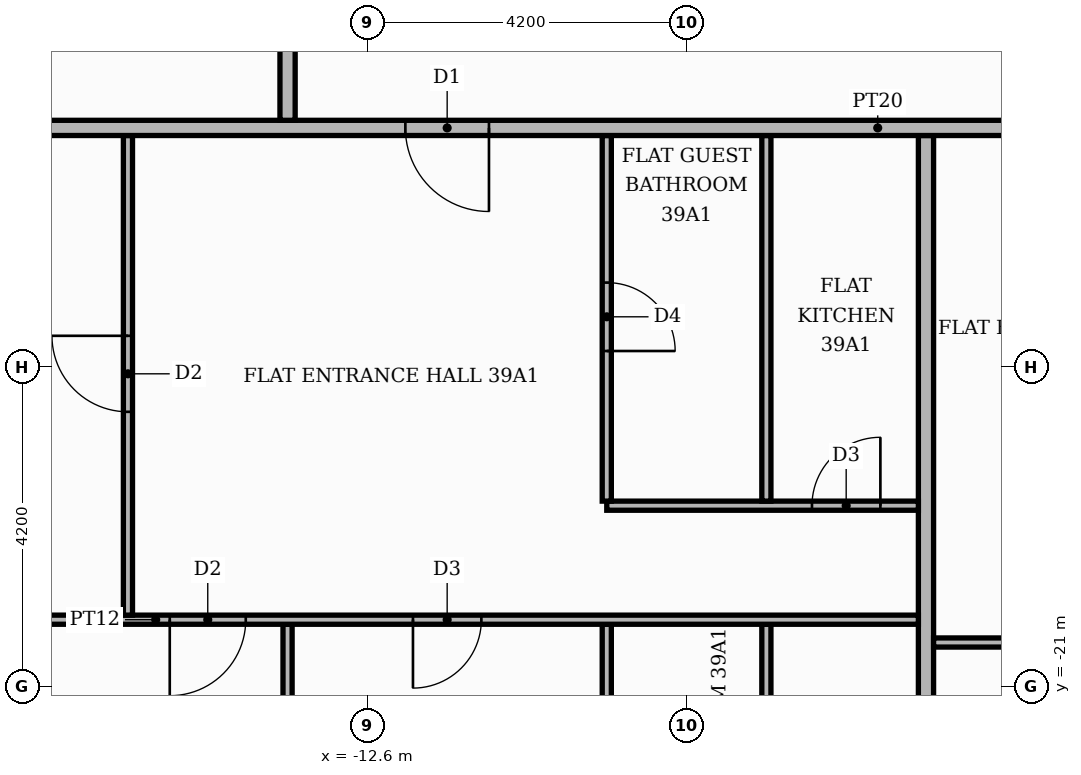
"""IFC4 building model, lengths in metres.
Left out: names, types, materials, properties, quantities, classifications, styles, units other than length and angle.
Written with IfcOpenShell. Run it as: python <this file> out.ifc"""

import sys

from ifc_helpers import new_model, si_unit, direction, frame, frame_2d, origin, place, context, subcontext, project, spatial, rectangle, extrude, element, fill, save


model = new_model("IFC4")
c1 = context("Model", 3, precision=1e-05, world=origin(), true_north=direction((0.0, 1.0)))
c2 = subcontext(c1, "Body", "Model", "MODEL_VIEW")
j1 = project(units=[si_unit("LENGTHUNIT", "METRE"), si_unit("PLANEANGLEUNIT", "RADIAN")], contexts=[c1])
p1 = place(None, origin())
s1 = spatial("IfcSite", under=j1, at=p1, CompositionType="ELEMENT")
p2 = place(p1, origin())
s2 = spatial("IfcBuilding", under=s1, at=p2, CompositionType="ELEMENT")
p3 = place(p2, frame((0.0, 0.0, 165.0)))
s3 = spatial("IfcBuildingStorey", under=s2, at=p3, CompositionType="ELEMENT", Elevation=165.0)
p4 = place(p3, frame((-13.65, -25.42, 0.0), z_axis=(0.0, 0.0, 1.0), x_axis=(0.0, 1.0, 0.0)))
e1 = element("IfcWall", 1, at=p4, inside=s3, PredefinedType="PARTITIONING", context=c2, shape_type="SweptSolid", body=[
    extrude(rectangle(XDim=5.24, YDim=0.12, at=frame_2d((2.62, 0.0))), origin(), (0.0, 0.0, 1.0), 3.48),
])
p5 = place(p3, frame((-9.45, -25.42, 0.0), z_axis=(0.0, 0.0, 1.0), x_axis=(0.0, 1.0, 0.0)))
e2 = element("IfcWall", 2, at=p5, inside=s3, PredefinedType="PARTITIONING", context=c2, shape_type="SweptSolid", body=[
    extrude(rectangle(XDim=5.24, YDim=0.12, at=frame_2d((2.62, 0.0))), origin(), (0.0, 0.0, 1.0), 3.48),
])
p6 = place(p5, frame((2.05, 0.0, 0.0)))
e3 = element("IfcOpeningElement", 3, at=p6, cuts=e2, PredefinedType="OPENING", context=c2, shape_type="SweptSolid", body=[
    extrude(rectangle(XDim=0.9, YDim=2.1, at=frame_2d((0.45, 1.05))), frame((0.0, 0.07, 0.0), z_axis=(0.0, -1.0, 0.0), x_axis=(1.0, 0.0, 0.0)), (0.0, 0.0, 1.0), 0.14),
])
p7 = place(p3, frame((-7.35, -25.42, 0.0), z_axis=(0.0, 0.0, 1.0), x_axis=(0.0, 1.0, 0.0)))
e4 = element("IfcWall", 4, at=p7, inside=s3, PredefinedType="PARTITIONING", context=c2, shape_type="SweptSolid", body=[
    extrude(rectangle(XDim=5.24, YDim=0.12, at=frame_2d((2.62, 0.0))), origin(), (0.0, 0.0, 1.0), 3.48),
])
p8 = place(p7, frame((2.05, 0.0, 0.0)))
e5 = element("IfcOpeningElement", 5, at=p8, cuts=e4, PredefinedType="OPENING", context=c2, shape_type="SweptSolid", body=[
    extrude(rectangle(XDim=0.9, YDim=2.1, at=frame_2d((0.45, 1.05))), frame((0.0, 0.07, 0.0), z_axis=(0.0, -1.0, 0.0), x_axis=(1.0, 0.0, 0.0)), (0.0, 0.0, 1.0), 0.14),
])
p9 = place(p3, frame((-5.25, -25.42, 0.0), z_axis=(0.0, 0.0, 1.0), x_axis=(0.0, 1.0, 0.0)))
e6 = element("IfcWall", 6, at=p9, inside=s3, PredefinedType="PARTITIONING", context=c2, shape_type="SweptSolid", body=[
    extrude(rectangle(XDim=11.67, YDim=0.2, at=frame_2d((5.835, 0.0))), origin(), (0.0, 0.0, 1.0), 3.48),
])
p10 = place(p3, frame((-5.15, -20.42, 0.0), z_axis=(0.0, 0.0, 1.0), x_axis=(1.0, 0.0, 0.0)))
e7 = element("IfcWall", 7, at=p10, inside=s3, PredefinedType="PARTITIONING", context=c2, shape_type="SweptSolid", body=[
    extrude(rectangle(XDim=18.7, YDim=0.12, at=frame_2d((9.35, 0.0))), origin(), (0.0, 0.0, 1.0), 3.48),
])
p11 = place(p10, frame((1.5, 0.0, 0.0)))
e8 = element("IfcOpeningElement", 8, at=p11, cuts=e7, PredefinedType="OPENING", context=c2, shape_type="SweptSolid", body=[
    extrude(rectangle(XDim=1.0, YDim=2.1, at=frame_2d((0.5, 1.05))), frame((0.0, 0.07, 0.0), z_axis=(0.0, -1.0, 0.0), x_axis=(1.0, 0.0, 0.0)), (0.0, 0.0, 1.0), 0.14),
])
p12 = place(p10, frame((5.75, 0.0, 0.0)))
e9 = element("IfcOpeningElement", 9, at=p12, cuts=e7, PredefinedType="OPENING", context=c2, shape_type="SweptSolid", body=[
    extrude(rectangle(XDim=0.9, YDim=2.1, at=frame_2d((0.45, 1.05))), frame((0.0, 0.07, 0.0), z_axis=(0.0, -1.0, 0.0), x_axis=(1.0, 0.0, 0.0)), (0.0, 0.0, 1.0), 0.14),
])
p13 = place(p10, frame((14.15, 0.0, 0.0)))
e10 = element("IfcOpeningElement", 10, at=p13, cuts=e7, PredefinedType="OPENING", context=c2, shape_type="SweptSolid", body=[
    extrude(rectangle(XDim=0.9, YDim=2.1, at=frame_2d((0.45, 1.05))), frame((0.0, 0.07, 0.0), z_axis=(0.0, -1.0, 0.0), x_axis=(1.0, 0.0, 0.0)), (0.0, 0.0, 1.0), 0.14),
])
p14 = place(p3, frame((-25.42, -20.12, 0.0), z_axis=(0.0, 0.0, 1.0), x_axis=(1.0, 0.0, 0.0)))
e11 = element("IfcWall", 11, at=p14, inside=s3, PredefinedType="PARTITIONING", context=c2, shape_type="SweptSolid", body=[
    extrude(rectangle(XDim=20.07, YDim=0.12, at=frame_2d((10.035, 0.0))), origin(), (0.0, 0.0, 1.0), 3.48),
])
p15 = place(p14, frame((10.22, 0.0, 0.0)))
e12 = element("IfcOpeningElement", 12, at=p15, cuts=e11, PredefinedType="OPENING", context=c2, shape_type="SweptSolid", body=[
    extrude(rectangle(XDim=1.0, YDim=2.1, at=frame_2d((0.5, 1.05))), frame((0.0, 0.07, 0.0), z_axis=(0.0, -1.0, 0.0), x_axis=(1.0, 0.0, 0.0)), (0.0, 0.0, 1.0), 0.14),
])
p16 = place(p14, frame((13.42, 0.0, 0.0)))
e13 = element("IfcOpeningElement", 13, at=p16, cuts=e11, PredefinedType="OPENING", context=c2, shape_type="SweptSolid", body=[
    extrude(rectangle(XDim=0.9, YDim=2.1, at=frame_2d((0.45, 1.05))), frame((0.0, 0.07, 0.0), z_axis=(0.0, -1.0, 0.0), x_axis=(1.0, 0.0, 0.0)), (0.0, 0.0, 1.0), 0.14),
])
p17 = place(p3, frame((-15.75, -20.06, 0.0), z_axis=(0.0, 0.0, 1.0), x_axis=(0.0, 1.0, 0.0)))
e14 = element("IfcWall", 14, at=p17, inside=s3, PredefinedType="PARTITIONING", context=c2, shape_type="SweptSolid", body=[
    extrude(rectangle(XDim=6.31, YDim=0.12, at=frame_2d((3.155, 0.0))), origin(), (0.0, 0.0, 1.0), 3.48),
])
p18 = place(p17, frame((2.675, 0.0, 0.0)))
e15 = element("IfcOpeningElement", 15, at=p18, cuts=e14, PredefinedType="OPENING", context=c2, shape_type="SweptSolid", body=[
    extrude(rectangle(XDim=1.0, YDim=2.1, at=frame_2d((0.5, 1.05))), frame((0.0, 0.07, 0.0), z_axis=(0.0, -1.0, 0.0), x_axis=(1.0, 0.0, 0.0)), (0.0, 0.0, 1.0), 0.14),
])
p19 = place(p3, frame((-9.45, -18.62, 0.0), z_axis=(0.0, 0.0, 1.0), x_axis=(1.0, 0.0, 0.0)))
e16 = element("IfcWall", 16, at=p19, inside=s3, PredefinedType="PARTITIONING", context=c2, shape_type="SweptSolid", body=[
    extrude(rectangle(XDim=4.1, YDim=0.12, at=frame_2d((2.05, 0.0))), origin(), (0.0, 0.0, 1.0), 3.48),
])
p20 = place(p19, frame((2.7, 0.0, 0.0)))
e17 = element("IfcOpeningElement", 17, at=p20, cuts=e16, PredefinedType="OPENING", context=c2, shape_type="SweptSolid", body=[
    extrude(rectangle(XDim=0.9, YDim=2.1, at=frame_2d((0.45, 1.05))), frame((0.0, 0.07, 0.0), z_axis=(0.0, -1.0, 0.0), x_axis=(1.0, 0.0, 0.0)), (0.0, 0.0, 1.0), 0.14),
])
p21 = place(p3, frame((-9.45, -18.56, 0.0), z_axis=(0.0, 0.0, 1.0), x_axis=(0.0, 1.0, 0.0)))
e18 = element("IfcWall", 18, at=p21, inside=s3, PredefinedType="PARTITIONING", context=c2, shape_type="SweptSolid", body=[
    extrude(rectangle(XDim=4.81, YDim=0.12, at=frame_2d((2.405, 0.0))), origin(), (0.0, 0.0, 1.0), 3.48),
])
p22 = place(p21, frame((1.975, 0.0, 0.0)))
e19 = element("IfcOpeningElement", 19, at=p22, cuts=e18, PredefinedType="OPENING", context=c2, shape_type="SweptSolid", body=[
    extrude(rectangle(XDim=0.9, YDim=2.1, at=frame_2d((0.45, 1.05))), frame((0.0, 0.07, 0.0), z_axis=(0.0, -1.0, 0.0), x_axis=(1.0, 0.0, 0.0)), (0.0, 0.0, 1.0), 0.14),
])
p23 = place(p3, frame((-7.35, -18.56, 0.0), z_axis=(0.0, 0.0, 1.0), x_axis=(0.0, 1.0, 0.0)))
e20 = element("IfcWall", 20, at=p23, inside=s3, PredefinedType="PARTITIONING", context=c2, shape_type="SweptSolid", body=[
    extrude(rectangle(XDim=4.81, YDim=0.12, at=frame_2d((2.405, 0.0))), origin(), (0.0, 0.0, 1.0), 3.48),
])
p24 = place(p3, frame((-25.42, -13.65, 0.0), z_axis=(0.0, 0.0, 1.0), x_axis=(1.0, 0.0, 0.0)))
e21 = element("IfcWall", 21, at=p24, inside=s3, PredefinedType="PARTITIONING", context=c2, shape_type="SweptSolid", body=[
    extrude(rectangle(XDim=39.07, YDim=0.2, at=frame_2d((19.535, 0.0))), origin(), (0.0, 0.0, 1.0), 3.48),
])
p25 = place(p24, frame((13.32, 0.0, 0.0)))
e22 = element("IfcOpeningElement", 22, at=p25, cuts=e21, PredefinedType="OPENING", context=c2, shape_type="SweptSolid", body=[
    extrude(rectangle(XDim=1.1, YDim=2.4, at=frame_2d((0.55, 1.2))), frame((0.0, 0.11, 0.0), z_axis=(0.0, -1.0, 0.0), x_axis=(1.0, 0.0, 0.0)), (0.0, 0.0, 1.0), 0.22),
])
p26 = place(p24, frame((21.72, 0.0, 0.0)))
e23 = element("IfcOpeningElement", 23, at=p26, cuts=e21, PredefinedType="OPENING", context=c2, shape_type="SweptSolid", body=[
    extrude(rectangle(XDim=1.1, YDim=2.4, at=frame_2d((0.55, 1.2))), frame((0.0, 0.11, 0.0), z_axis=(0.0, -1.0, 0.0), x_axis=(1.0, 0.0, 0.0)), (0.0, 0.0, 1.0), 0.22),
])
p27 = place(p3, frame((-13.65, -13.55, 0.0), z_axis=(0.0, 0.0, 1.0), x_axis=(0.0, 1.0, 0.0)))
e24 = element("IfcWall", 24, at=p27, inside=s3, PredefinedType="PARTITIONING", context=c2, shape_type="SweptSolid", body=[
    extrude(rectangle(XDim=2.45, YDim=0.2, at=frame_2d((1.225, 0.0))), origin(), (0.0, 0.0, 1.0), 3.48),
])
p28 = place(p25, frame((1.1, 0.0, 0.0), z_axis=(0.0, 0.0, 1.0), x_axis=(-1.0, 0.0, 0.0)))
e25 = element("IfcDoor", 25, at=p28, inside=s3, OperationType="SINGLE_SWING_RIGHT", PredefinedType="DOOR", context=c2, shape_type="SweptSolid", body=[
    extrude(rectangle(XDim=1.1, YDim=2.4, at=frame_2d((0.55, 1.2))), frame((0.0, 0.025, 0.0), z_axis=(0.0, -1.0, 0.0), x_axis=(1.0, 0.0, 0.0)), (0.0, 0.0, 1.0), 0.05),
])
fill(e22, e25)
p29 = place(p18, origin())
e26 = element("IfcDoor", 26, at=p29, inside=s3, OperationType="SINGLE_SWING_RIGHT", PredefinedType="DOOR", context=c2, shape_type="SweptSolid", body=[
    extrude(rectangle(XDim=1.0, YDim=2.1, at=frame_2d((0.5, 1.05))), frame((0.0, 0.025, 0.0), z_axis=(0.0, -1.0, 0.0), x_axis=(1.0, 0.0, 0.0)), (0.0, 0.0, 1.0), 0.05),
])
fill(e15, e26)
p30 = place(p22, frame((0.9, 0.0, 0.0), z_axis=(0.0, 0.0, 1.0), x_axis=(-1.0, 0.0, 0.0)))
e27 = element("IfcDoor", 27, at=p30, inside=s3, OperationType="SINGLE_SWING_LEFT", PredefinedType="DOOR", context=c2, shape_type="SweptSolid", body=[
    extrude(rectangle(XDim=0.9, YDim=2.1, at=frame_2d((0.45, 1.05))), frame((0.0, 0.025, 0.0), z_axis=(0.0, -1.0, 0.0), x_axis=(1.0, 0.0, 0.0)), (0.0, 0.0, 1.0), 0.05),
])
fill(e19, e27)
p31 = place(p20, origin())
e28 = element("IfcDoor", 28, at=p31, inside=s3, OperationType="SINGLE_SWING_RIGHT", PredefinedType="DOOR", context=c2, shape_type="SweptSolid", body=[
    extrude(rectangle(XDim=0.9, YDim=2.1, at=frame_2d((0.45, 1.05))), frame((0.0, 0.025, 0.0), z_axis=(0.0, -1.0, 0.0), x_axis=(1.0, 0.0, 0.0)), (0.0, 0.0, 1.0), 0.05),
])
fill(e17, e28)
p32 = place(p15, frame((1.0, 0.0, 0.0), z_axis=(0.0, 0.0, 1.0), x_axis=(-1.0, 0.0, 0.0)))
e29 = element("IfcDoor", 29, at=p32, inside=s3, OperationType="SINGLE_SWING_LEFT", PredefinedType="DOOR", context=c2, shape_type="SweptSolid", body=[
    extrude(rectangle(XDim=1.0, YDim=2.1, at=frame_2d((0.5, 1.05))), frame((0.0, 0.025, 0.0), z_axis=(0.0, -1.0, 0.0), x_axis=(1.0, 0.0, 0.0)), (0.0, 0.0, 1.0), 0.05),
])
fill(e12, e29)
p33 = place(p16, frame((0.9, 0.0, 0.0), z_axis=(0.0, 0.0, 1.0), x_axis=(-1.0, 0.0, 0.0)))
e30 = element("IfcDoor", 30, at=p33, inside=s3, OperationType="SINGLE_SWING_LEFT", PredefinedType="DOOR", context=c2, shape_type="SweptSolid", body=[
    extrude(rectangle(XDim=0.9, YDim=2.1, at=frame_2d((0.45, 1.05))), frame((0.0, 0.025, 0.0), z_axis=(0.0, -1.0, 0.0), x_axis=(1.0, 0.0, 0.0)), (0.0, 0.0, 1.0), 0.05),
])
fill(e13, e30)
save(model, sys.argv[1])
